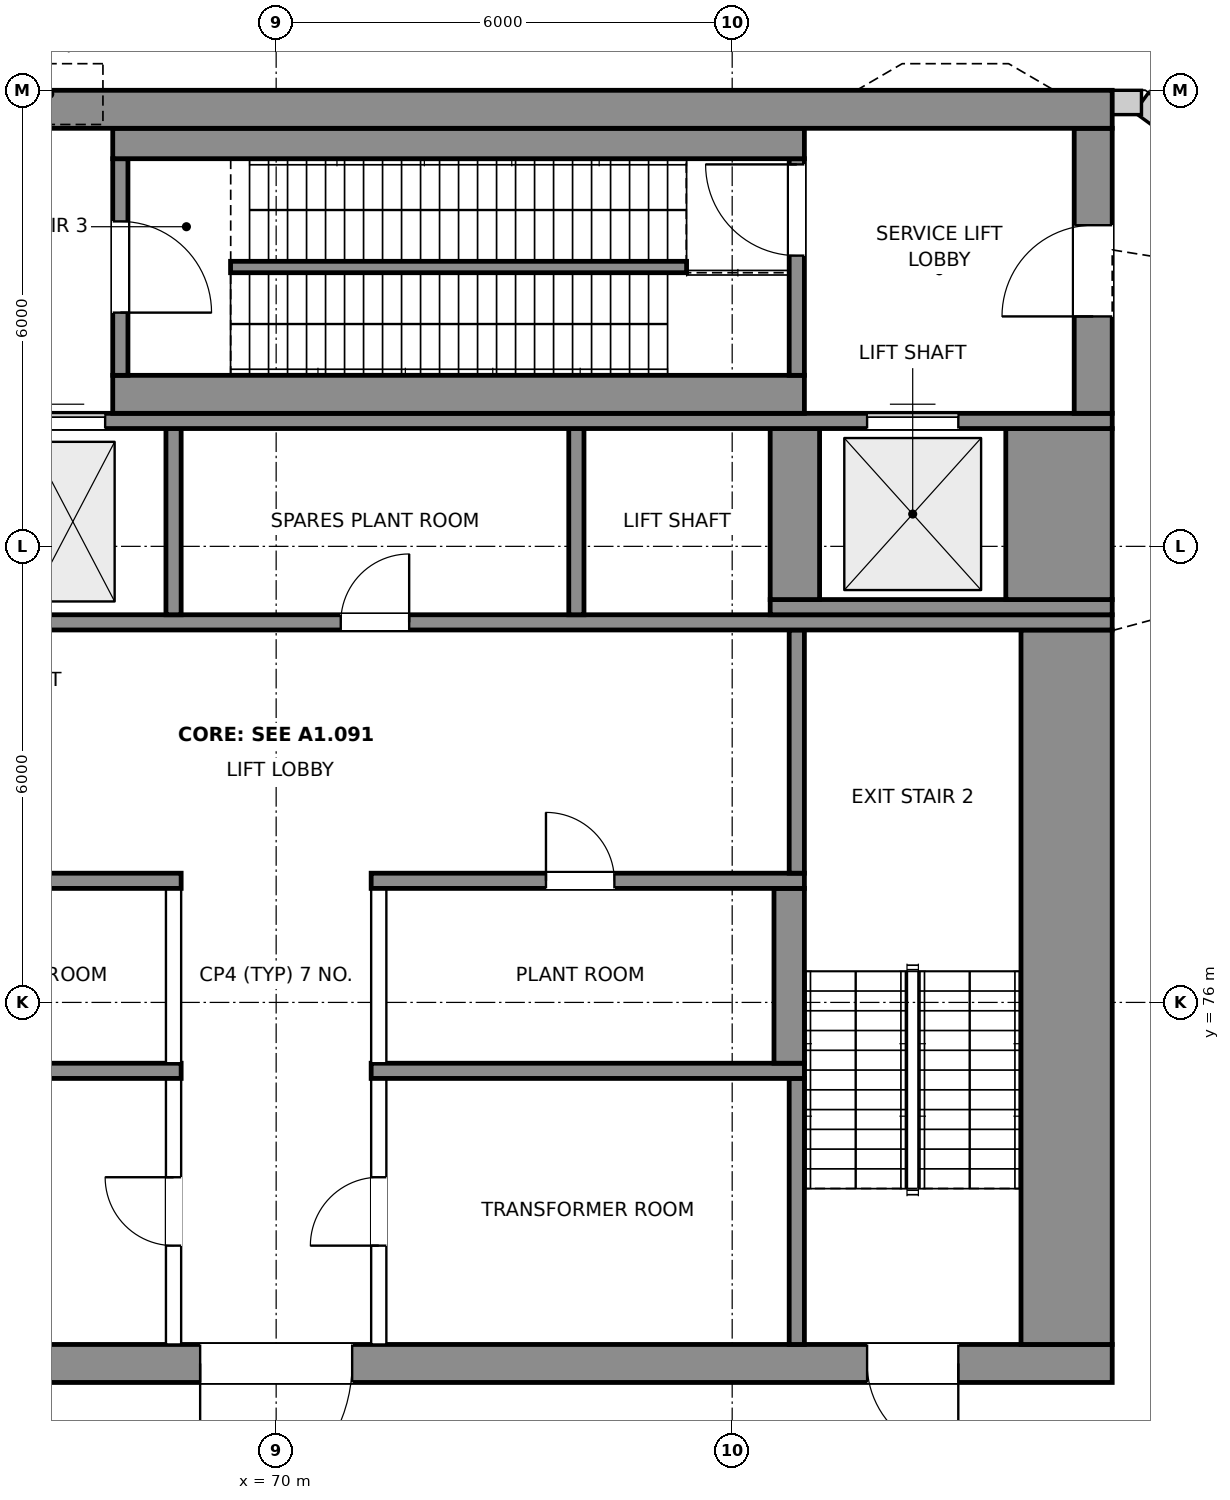
"""IFC4 building model, lengths in metres.
Left out: names, types, materials, properties, quantities, classifications, styles, units other than length and angle.
Written with IfcOpenShell. Run it as: python <this file> out.ifc"""

import sys

from ifc_helpers import new_model, si_unit, direction, frame, frame_2d, origin, place, context, subcontext, project, spatial, rectangle, extrude, element, fill, save


model = new_model("IFC4")
c1 = context("Model", 3, precision=1e-05, world=origin(), true_north=direction((0.0, 1.0)))
c2 = subcontext(c1, "Body", "Model", "MODEL_VIEW")
j1 = project(units=[si_unit("LENGTHUNIT", "METRE"), si_unit("PLANEANGLEUNIT", "RADIAN")], contexts=[c1])
p1 = place(None, origin())
s1 = spatial("IfcSite", under=j1, at=p1, CompositionType="ELEMENT")
p2 = place(p1, origin())
s2 = spatial("IfcBuilding", under=s1, at=p2, CompositionType="ELEMENT")
p3 = place(p2, frame((0.0, 0.0, 328.7)))
s3 = spatial("IfcBuildingStorey", under=s2, at=p3, CompositionType="ELEMENT", Elevation=328.7)
p4 = place(p3, frame((85.979, 84.503, 0.0), z_axis=(0.0, 0.0, 1.0), x_axis=(-0.809014901919, 0.5877881323, 0.0)))
e1 = element("IfcWall", 1, at=p4, inside=s3, PredefinedType="SOLIDWALL", context=c2, shape_type="SweptSolid", body=[
    extrude(rectangle(XDim=5.678, YDim=0.32, at=frame_2d((2.839, 0.0))), origin(), (0.0, 0.0, 1.0), 4.2),
])
p5 = place(p3, frame((81.385, 87.84, 0.0), z_axis=(0.0, 0.0, 1.0), x_axis=(-1.0, 0.0, 0.0)))
e2 = element("IfcWall", 2, at=p5, inside=s3, PredefinedType="SOLIDWALL", context=c2, shape_type="SweptSolid", body=[
    extrude(rectangle(XDim=0.385, YDim=0.32, at=frame_2d((0.192, 0.0))), origin(), (0.0, 0.0, 1.0), 4.2),
])
p6 = place(p3, frame((59.0, 71.25, 0.0), z_axis=(0.0, 0.0, 1.0), x_axis=(1.0, 0.0, 0.0)))
e3 = element("IfcWall", 3, at=p6, inside=s3, PredefinedType="SHEAR", context=c2, shape_type="SweptSolid", body=[
    extrude(rectangle(XDim=22.0, YDim=0.5, at=frame_2d((11.0, 0.0))), origin(), (0.0, 0.0, 1.0), 4.5),
])
p7 = place(p6, frame((2.025, 0.0, 0.0)))
e4 = element("IfcOpeningElement", 4, at=p7, cuts=e3, PredefinedType="OPENING", context=c2, shape_type="SweptSolid", body=[
    extrude(rectangle(XDim=1.2, YDim=2.1, at=frame_2d((0.6, 1.05))), frame((0.0, 0.26, 0.0), z_axis=(0.0, -1.0, 0.0), x_axis=(1.0, 0.0, 0.0)), (0.0, 0.0, 1.0), 0.52),
])
p8 = place(p6, frame((18.775, 0.0, 0.0)))
e5 = element("IfcOpeningElement", 5, at=p8, cuts=e3, PredefinedType="OPENING", context=c2, shape_type="SweptSolid", body=[
    extrude(rectangle(XDim=1.2, YDim=2.1, at=frame_2d((0.6, 1.05))), frame((0.0, 0.26, 0.0), z_axis=(0.0, -1.0, 0.0), x_axis=(1.0, 0.0, 0.0)), (0.0, 0.0, 1.0), 0.52),
])
p9 = place(p6, frame((10.0, 0.0, 0.0)))
e6 = element("IfcOpeningElement", 6, at=p9, cuts=e3, PredefinedType="OPENING", context=c2, shape_type="SweptSolid", body=[
    extrude(rectangle(XDim=2.0, YDim=2.1, at=frame_2d((1.0, 1.05))), frame((0.0, 0.26, 0.0), z_axis=(0.0, -1.0, 0.0), x_axis=(1.0, 0.0, 0.0)), (0.0, 0.0, 1.0), 0.52),
])
p10 = place(p3, frame((68.65, 71.5, 0.0), z_axis=(0.0, 0.0, 1.0), x_axis=(0.0, 1.0, 0.0)))
e7 = element("IfcWall", 7, at=p10, inside=s3, PredefinedType="PARTITIONING", context=c2, shape_type="SweptSolid", body=[
    extrude(rectangle(XDim=3.5, YDim=0.2, at=frame_2d((1.75, 0.0))), origin(), (0.0, 0.0, 1.0), 4.2),
])
p11 = place(p10, frame((1.3, 0.0, 0.0)))
e8 = element("IfcOpeningElement", 8, at=p11, cuts=e7, PredefinedType="OPENING", context=c2, shape_type="SweptSolid", body=[
    extrude(rectangle(XDim=0.9, YDim=2.1, at=frame_2d((0.45, 1.05))), frame((0.0, 0.11, 0.0), z_axis=(0.0, -1.0, 0.0), x_axis=(1.0, 0.0, 0.0)), (0.0, 0.0, 1.0), 0.22),
])
p12 = place(p3, frame((71.35, 71.5, 0.0), z_axis=(0.0, 0.0, 1.0), x_axis=(0.0, 1.0, 0.0)))
e9 = element("IfcWall", 9, at=p12, inside=s3, PredefinedType="PARTITIONING", context=c2, shape_type="SweptSolid", body=[
    extrude(rectangle(XDim=3.5, YDim=0.2, at=frame_2d((1.75, 0.0))), origin(), (0.0, 0.0, 1.0), 4.2),
])
p13 = place(p12, frame((1.3, 0.0, 0.0)))
e10 = element("IfcOpeningElement", 10, at=p13, cuts=e9, PredefinedType="OPENING", context=c2, shape_type="SweptSolid", body=[
    extrude(rectangle(XDim=0.9, YDim=2.1, at=frame_2d((0.45, 1.05))), frame((0.0, 0.11, 0.0), z_axis=(0.0, -1.0, 0.0), x_axis=(1.0, 0.0, 0.0)), (0.0, 0.0, 1.0), 0.22),
])
p14 = place(p3, frame((76.85, 71.5, 0.0), z_axis=(0.0, 0.0, 1.0), x_axis=(0.0, 1.0, 0.0)))
e11 = element("IfcWall", 11, at=p14, inside=s3, PredefinedType="SHEAR", context=c2, shape_type="SweptSolid", body=[
    extrude(rectangle(XDim=3.5, YDim=0.2, at=frame_2d((1.75, 0.0))), origin(), (0.0, 0.0, 1.0), 4.5),
])
p15 = place(p3, frame((80.4, 71.5, 0.0), z_axis=(0.0, 0.0, 1.0), x_axis=(0.0, 1.0, 0.0)))
e12 = element("IfcWall", 12, at=p15, inside=s3, PredefinedType="SHEAR", context=c2, shape_type="SweptSolid", body=[
    extrude(rectangle(XDim=9.4, YDim=1.2, at=frame_2d((4.7, 0.0))), origin(), (0.0, 0.0, 1.0), 4.5),
])
for number, where, z_axis, x_axis in (
    (13, (63.05, 75.1, 0.0), (0.0, 0.0, 1.0), (1.0, 0.0, 0.0)),
    (14, (71.25, 75.1, 0.0), (0.0, 0.0, 1.0), (1.0, 0.0, 0.0)),
):
    element("IfcWall", number, at=place(p3, frame(where, z_axis=z_axis, x_axis=x_axis)), inside=s3, PredefinedType="SHEAR", context=c2, shape_type="SweptSolid", body=[
        extrude(rectangle(XDim=5.7, YDim=0.2, at=frame_2d((2.85, 0.0))), origin(), (0.0, 0.0, 1.0), 4.5),
    ])
for number, where, z_axis, x_axis in (
    (15, (68.65, 75.2, 0.0), (0.0, 0.0, 1.0), (0.0, 1.0, 0.0)),
    (16, (71.35, 75.2, 0.0), (0.0, 0.0, 1.0), (0.0, 1.0, 0.0)),
):
    element("IfcWall", number, at=place(p3, frame(where, z_axis=z_axis, x_axis=x_axis)), inside=s3, PredefinedType="PARTITIONING", context=c2, shape_type="SweptSolid", body=[
        extrude(rectangle(XDim=2.3, YDim=0.2, at=frame_2d((1.15, 0.0))), origin(), (0.0, 0.0, 1.0), 4.2),
    ])
p16 = place(p3, frame((76.75, 75.2, 0.0), z_axis=(0.0, 0.0, 1.0), x_axis=(0.0, 1.0, 0.0)))
e17 = element("IfcWall", 17, at=p16, inside=s3, PredefinedType="SHEAR", context=c2, shape_type="SweptSolid", body=[
    extrude(rectangle(XDim=2.3, YDim=0.4, at=frame_2d((1.15, 0.0))), origin(), (0.0, 0.0, 1.0), 4.5),
])
p17 = place(p3, frame((63.05, 77.6, 0.0), z_axis=(0.0, 0.0, 1.0), x_axis=(1.0, 0.0, 0.0)))
e18 = element("IfcWall", 18, at=p17, inside=s3, PredefinedType="SHEAR", context=c2, shape_type="SweptSolid", body=[
    extrude(rectangle(XDim=5.7, YDim=0.2, at=frame_2d((2.85, 0.0))), origin(), (0.0, 0.0, 1.0), 4.5),
])
p18 = place(p17, frame((2.5, 0.0, 0.0)))
e19 = element("IfcOpeningElement", 19, at=p18, cuts=e18, PredefinedType="OPENING", context=c2, shape_type="SweptSolid", body=[
    extrude(rectangle(XDim=0.9, YDim=2.1, at=frame_2d((0.45, 1.05))), frame((0.0, 0.11, 0.0), z_axis=(0.0, -1.0, 0.0), x_axis=(1.0, 0.0, 0.0)), (0.0, 0.0, 1.0), 0.22),
])
p19 = place(p3, frame((71.25, 77.6, 0.0), z_axis=(0.0, 0.0, 1.0), x_axis=(1.0, 0.0, 0.0)))
e20 = element("IfcWall", 20, at=p19, inside=s3, PredefinedType="SHEAR", context=c2, shape_type="SweptSolid", body=[
    extrude(rectangle(XDim=5.7, YDim=0.2, at=frame_2d((2.85, 0.0))), origin(), (0.0, 0.0, 1.0), 4.5),
])
p20 = place(p19, frame((2.3, 0.0, 0.0)))
e21 = element("IfcOpeningElement", 21, at=p20, cuts=e20, PredefinedType="OPENING", context=c2, shape_type="SweptSolid", body=[
    extrude(rectangle(XDim=0.9, YDim=2.1, at=frame_2d((0.45, 1.05))), frame((0.0, 0.11, 0.0), z_axis=(0.0, -1.0, 0.0), x_axis=(1.0, 0.0, 0.0)), (0.0, 0.0, 1.0), 0.22),
])
p21 = place(p3, frame((76.85, 77.7, 0.0), z_axis=(0.0, 0.0, 1.0), x_axis=(0.0, 1.0, 0.0)))
e22 = element("IfcWall", 22, at=p21, inside=s3, PredefinedType="SHEAR", context=c2, shape_type="SweptSolid", body=[
    extrude(rectangle(XDim=3.2, YDim=0.2, at=frame_2d((1.6, 0.0))), origin(), (0.0, 0.0, 1.0), 4.5),
])
p22 = place(p3, frame((59.0, 81.0, 0.0), z_axis=(0.0, 0.0, 1.0), x_axis=(1.0, 0.0, 0.0)))
e23 = element("IfcWall", 23, at=p22, inside=s3, PredefinedType="SHEAR", context=c2, shape_type="SweptSolid", body=[
    extrude(rectangle(XDim=22.0, YDim=0.2, at=frame_2d((11.0, 0.0))), origin(), (0.0, 0.0, 1.0), 4.5),
])
p23 = place(p22, frame((11.85, 0.0, 0.0)))
e24 = element("IfcOpeningElement", 24, at=p23, cuts=e23, PredefinedType="OPENING", context=c2, shape_type="SweptSolid", body=[
    extrude(rectangle(XDim=0.9, YDim=2.1, at=frame_2d((0.45, 1.05))), frame((0.0, 0.11, 0.0), z_axis=(0.0, -1.0, 0.0), x_axis=(1.0, 0.0, 0.0)), (0.0, 0.0, 1.0), 0.22),
])
for number, where, z_axis, x_axis in (
    (25, (68.65, 81.1, 0.0), (0.0, 0.0, 1.0), (0.0, 1.0, 0.0)),
    (26, (73.95, 81.1, 0.0), (0.0, 0.0, 1.0), (0.0, 1.0, 0.0)),
):
    element("IfcWall", number, at=place(p3, frame(where, z_axis=z_axis, x_axis=x_axis)), inside=s3, PredefinedType="SHEAR", context=c2, shape_type="SweptSolid", body=[
        extrude(rectangle(XDim=2.45, YDim=0.2, at=frame_2d((1.225, 0.0))), origin(), (0.0, 0.0, 1.0), 4.5),
    ])
p24 = place(p3, frame((76.5, 81.2, 0.0), z_axis=(0.0, 0.0, 1.0), x_axis=(1.0, 0.0, 0.0)))
e27 = element("IfcWall", 27, at=p24, inside=s3, PredefinedType="SHEAR", context=c2, shape_type="SweptSolid", body=[
    extrude(rectangle(XDim=4.5, YDim=0.2, at=frame_2d((2.25, 0.0))), origin(), (0.0, 0.0, 1.0), 4.5),
])
p25 = place(p3, frame((76.825, 81.3, 0.0), z_axis=(0.0, 0.0, 1.0), x_axis=(0.0, 1.0, 0.0)))
e28 = element("IfcWall", 28, at=p25, inside=s3, PredefinedType="SHEAR", context=c2, shape_type="SweptSolid", body=[
    extrude(rectangle(XDim=2.25, YDim=0.65, at=frame_2d((1.125, 0.0))), origin(), (0.0, 0.0, 1.0), 4.5),
])
p26 = place(p3, frame((80.3, 81.3, 0.0), z_axis=(0.0, 0.0, 1.0), x_axis=(0.0, 1.0, 0.0)))
e29 = element("IfcWall", 29, at=p26, inside=s3, PredefinedType="SHEAR", context=c2, shape_type="SweptSolid", body=[
    extrude(rectangle(XDim=2.25, YDim=1.4, at=frame_2d((1.125, 0.0))), origin(), (0.0, 0.0, 1.0), 4.5),
])
p27 = place(p3, frame((59.0, 83.65, 0.0), z_axis=(0.0, 0.0, 1.0), x_axis=(1.0, 0.0, 0.0)))
e30 = element("IfcWall", 30, at=p27, inside=s3, PredefinedType="SHEAR", context=c2, shape_type="SweptSolid", body=[
    extrude(rectangle(XDim=22.0, YDim=0.2, at=frame_2d((11.0, 0.0))), origin(), (0.0, 0.0, 1.0), 4.5),
])
p28 = place(p27, frame((5.125, 0.0, 0.0)))
e31 = element("IfcOpeningElement", 31, at=p28, cuts=e30, PredefinedType="OPENING", context=c2, shape_type="SweptSolid", body=[
    extrude(rectangle(XDim=1.1, YDim=2.1, at=frame_2d((0.55, 1.05))), frame((0.0, 0.11, 0.0), z_axis=(0.0, -1.0, 0.0), x_axis=(1.0, 0.0, 0.0)), (0.0, 0.0, 1.0), 0.22),
])
p29 = place(p27, frame((7.65, 0.0, 0.0)))
e32 = element("IfcOpeningElement", 32, at=p29, cuts=e30, PredefinedType="OPENING", context=c2, shape_type="SweptSolid", body=[
    extrude(rectangle(XDim=1.1, YDim=2.1, at=frame_2d((0.55, 1.05))), frame((0.0, 0.11, 0.0), z_axis=(0.0, -1.0, 0.0), x_axis=(1.0, 0.0, 0.0)), (0.0, 0.0, 1.0), 0.22),
])
p30 = place(p27, frame((18.775, 0.0, 0.0)))
e33 = element("IfcOpeningElement", 33, at=p30, cuts=e30, PredefinedType="OPENING", context=c2, shape_type="SweptSolid", body=[
    extrude(rectangle(XDim=1.2, YDim=2.1, at=frame_2d((0.6, 1.05))), frame((0.0, 0.11, 0.0), z_axis=(0.0, -1.0, 0.0), x_axis=(1.0, 0.0, 0.0)), (0.0, 0.0, 1.0), 0.22),
])
p31 = place(p27, frame((2.075, 0.0, 0.0)))
e34 = element("IfcOpeningElement", 34, at=p31, cuts=e30, PredefinedType="OPENING", context=c2, shape_type="SweptSolid", body=[
    extrude(rectangle(XDim=1.1, YDim=2.1, at=frame_2d((0.55, 1.05))), frame((0.0, 0.11, 0.0), z_axis=(0.0, -1.0, 0.0), x_axis=(1.0, 0.0, 0.0)), (0.0, 0.0, 1.0), 0.22),
])
p32 = place(p3, frame((67.85, 84.0, 0.0), z_axis=(0.0, 0.0, 1.0), x_axis=(1.0, 0.0, 0.0)))
e35 = element("IfcWall", 35, at=p32, inside=s3, PredefinedType="SHEAR", context=c2, shape_type="SweptSolid", body=[
    extrude(rectangle(XDim=9.1, YDim=0.5, at=frame_2d((4.55, 0.0))), origin(), (0.0, 0.0, 1.0), 4.5),
])
p33 = place(p3, frame((80.75, 83.75, 0.0), z_axis=(0.0, 0.0, 1.0), x_axis=(0.0, 1.0, 0.0)))
e36 = element("IfcWall", 36, at=p33, inside=s3, PredefinedType="SHEAR", context=c2, shape_type="SweptSolid", body=[
    extrude(rectangle(XDim=3.75, YDim=0.5, at=frame_2d((1.875, 0.0))), origin(), (0.0, 0.0, 1.0), 4.5),
])
p34 = place(p33, frame((1.275, 0.0, 0.0)))
e37 = element("IfcOpeningElement", 37, at=p34, cuts=e36, PredefinedType="OPENING", context=c2, shape_type="SweptSolid", body=[
    extrude(rectangle(XDim=1.2, YDim=2.1, at=frame_2d((0.6, 1.05))), frame((0.0, 0.26, 0.0), z_axis=(0.0, -1.0, 0.0), x_axis=(1.0, 0.0, 0.0)), (0.0, 0.0, 1.0), 0.52),
])
p35 = place(p3, frame((67.95, 84.25, 0.0), z_axis=(0.0, 0.0, 1.0), x_axis=(0.0, 1.0, 0.0)))
e38 = element("IfcWall", 38, at=p35, inside=s3, PredefinedType="SHEAR", context=c2, shape_type="SweptSolid", body=[
    extrude(rectangle(XDim=2.85, YDim=0.2, at=frame_2d((1.425, 0.0))), origin(), (0.0, 0.0, 1.0), 4.5),
])
p36 = place(p35, frame((0.825, 0.0, 0.0)))
e39 = element("IfcOpeningElement", 39, at=p36, cuts=e38, PredefinedType="OPENING", context=c2, shape_type="SweptSolid", body=[
    extrude(rectangle(XDim=1.2, YDim=2.1, at=frame_2d((0.6, 1.05))), frame((0.0, 0.11, 0.0), z_axis=(0.0, -1.0, 0.0), x_axis=(1.0, 0.0, 0.0)), (0.0, 0.0, 1.0), 0.22),
])
p37 = place(p3, frame((76.85, 84.25, 0.0), z_axis=(0.0, 0.0, 1.0), x_axis=(0.0, 1.0, 0.0)))
e40 = element("IfcWall", 40, at=p37, inside=s3, PredefinedType="SHEAR", context=c2, shape_type="SweptSolid", body=[
    extrude(rectangle(XDim=2.85, YDim=0.2, at=frame_2d((1.425, 0.0))), origin(), (0.0, 0.0, 1.0), 4.5),
])
p38 = place(p37, frame((1.575, 0.0, 0.0)))
e41 = element("IfcOpeningElement", 41, at=p38, cuts=e40, PredefinedType="OPENING", context=c2, shape_type="SweptSolid", body=[
    extrude(rectangle(XDim=1.2, YDim=2.1, at=frame_2d((0.6, 1.05))), frame((0.0, 0.11, 0.0), z_axis=(0.0, -1.0, 0.0), x_axis=(1.0, 0.0, 0.0)), (0.0, 0.0, 1.0), 0.22),
])
p39 = place(p3, frame((67.85, 87.3, 0.0), z_axis=(0.0, 0.0, 1.0), x_axis=(1.0, 0.0, 0.0)))
e42 = element("IfcWall", 42, at=p39, inside=s3, PredefinedType="SHEAR", context=c2, shape_type="SweptSolid", body=[
    extrude(rectangle(XDim=9.1, YDim=0.4, at=frame_2d((4.55, 0.0))), origin(), (0.0, 0.0, 1.0), 4.5),
])
p40 = place(p3, frame((59.0, 87.75, 0.0), z_axis=(0.0, 0.0, 1.0), x_axis=(1.0, 0.0, 0.0)))
e43 = element("IfcWall", 43, at=p40, inside=s3, PredefinedType="SHEAR", context=c2, shape_type="SweptSolid", body=[
    extrude(rectangle(XDim=22.0, YDim=0.5, at=frame_2d((11.0, 0.0))), origin(), (0.0, 0.0, 1.0), 4.5),
])
p41 = place(p3, frame((69.4, 85.675, 0.0), z_axis=(0.0, 0.0, 1.0), x_axis=(1.0, 0.0, 0.0)))
e44 = element("IfcWall", 44, at=p41, inside=s3, PredefinedType="SHEAR", context=c2, shape_type="SweptSolid", body=[
    extrude(rectangle(XDim=6.0, YDim=0.15, at=frame_2d((3.0, 0.0))), origin(), (0.0, 0.0, 1.0), 4.5),
])
p42 = place(p8, frame((1.2, 0.0, 0.0), z_axis=(0.0, 0.0, 1.0), x_axis=(-1.0, 0.0, 0.0)))
e45 = element("IfcDoor", 45, at=p42, inside=s3, OperationType="SINGLE_SWING_LEFT", PredefinedType="DOOR", context=c2, shape_type="SweptSolid", body=[
    extrude(rectangle(XDim=1.2, YDim=2.1, at=frame_2d((0.6, 1.05))), frame((0.0, 0.025, 0.0), z_axis=(0.0, -1.0, 0.0), x_axis=(1.0, 0.0, 0.0)), (0.0, 0.0, 1.0), 0.05),
])
fill(e5, e45)
p43 = place(p36, frame((1.2, 0.0, 0.0), z_axis=(0.0, 0.0, 1.0), x_axis=(-1.0, 0.0, 0.0)))
e46 = element("IfcDoor", 46, at=p43, inside=s3, OperationType="SINGLE_SWING_RIGHT", PredefinedType="DOOR", context=c2, shape_type="SweptSolid", body=[
    extrude(rectangle(XDim=1.2, YDim=2.1, at=frame_2d((0.6, 1.05))), frame((0.0, 0.025, 0.0), z_axis=(0.0, -1.0, 0.0), x_axis=(1.0, 0.0, 0.0)), (0.0, 0.0, 1.0), 0.05),
])
fill(e39, e46)
p44 = place(p38, origin())
e47 = element("IfcDoor", 47, at=p44, inside=s3, OperationType="SINGLE_SWING_RIGHT", PredefinedType="DOOR", context=c2, shape_type="SweptSolid", body=[
    extrude(rectangle(XDim=1.2, YDim=2.1, at=frame_2d((0.6, 1.05))), frame((0.0, 0.025, 0.0), z_axis=(0.0, -1.0, 0.0), x_axis=(1.0, 0.0, 0.0)), (0.0, 0.0, 1.0), 0.05),
])
fill(e41, e47)
p45 = place(p9, frame((2.0, 0.0, 0.0), z_axis=(0.0, 0.0, 1.0), x_axis=(-1.0, 0.0, 0.0)))
e48 = element("IfcDoor", 48, at=p45, inside=s3, OperationType="DOUBLE_DOOR_SINGLE_SWING", PredefinedType="DOOR", context=c2, shape_type="SweptSolid", body=[
    extrude(rectangle(XDim=2.0, YDim=2.1, at=frame_2d((1.0, 1.05))), frame((0.0, 0.025, 0.0), z_axis=(0.0, -1.0, 0.0), x_axis=(1.0, 0.0, 0.0)), (0.0, 0.0, 1.0), 0.05),
])
fill(e6, e48)
p46 = place(p11, origin())
e49 = element("IfcDoor", 49, at=p46, inside=s3, OperationType="SINGLE_SWING_RIGHT", PredefinedType="DOOR", context=c2, shape_type="SweptSolid", body=[
    extrude(rectangle(XDim=0.9, YDim=2.1, at=frame_2d((0.45, 1.05))), frame((0.0, 0.025, 0.0), z_axis=(0.0, -1.0, 0.0), x_axis=(1.0, 0.0, 0.0)), (0.0, 0.0, 1.0), 0.05),
])
fill(e8, e49)
p47 = place(p13, origin())
e50 = element("IfcDoor", 50, at=p47, inside=s3, OperationType="SINGLE_SWING_LEFT", PredefinedType="DOOR", context=c2, shape_type="SweptSolid", body=[
    extrude(rectangle(XDim=0.9, YDim=2.1, at=frame_2d((0.45, 1.05))), frame((0.0, 0.025, 0.0), z_axis=(0.0, -1.0, 0.0), x_axis=(1.0, 0.0, 0.0)), (0.0, 0.0, 1.0), 0.05),
])
fill(e10, e50)
p48 = place(p34, origin())
e51 = element("IfcDoor", 51, at=p48, inside=s3, OperationType="SINGLE_SWING_LEFT", PredefinedType="DOOR", context=c2, shape_type="SweptSolid", body=[
    extrude(rectangle(XDim=1.2, YDim=2.1, at=frame_2d((0.6, 1.05))), frame((0.0, 0.025, 0.0), z_axis=(0.0, -1.0, 0.0), x_axis=(1.0, 0.0, 0.0)), (0.0, 0.0, 1.0), 0.05),
])
fill(e37, e51)
p49 = place(p29, origin())
e52 = element("IfcDoor", 52, at=p49, inside=s3, OperationType="DOUBLE_DOOR_SLIDING", PredefinedType="DOOR", context=c2, shape_type="SweptSolid", body=[
    extrude(rectangle(XDim=1.1, YDim=2.1, at=frame_2d((0.55, 1.05))), frame((0.0, 0.025, 0.0), z_axis=(0.0, -1.0, 0.0), x_axis=(1.0, 0.0, 0.0)), (0.0, 0.0, 1.0), 0.05),
])
fill(e32, e52)
p50 = place(p30, origin())
e53 = element("IfcDoor", 53, at=p50, inside=s3, OperationType="DOUBLE_DOOR_SLIDING", PredefinedType="DOOR", context=c2, shape_type="SweptSolid", body=[
    extrude(rectangle(XDim=1.2, YDim=2.1, at=frame_2d((0.6, 1.05))), frame((0.0, 0.025, 0.0), z_axis=(0.0, -1.0, 0.0), x_axis=(1.0, 0.0, 0.0)), (0.0, 0.0, 1.0), 0.05),
])
fill(e33, e53)
p51 = place(p20, origin())
e54 = element("IfcDoor", 54, at=p51, inside=s3, OperationType="SINGLE_SWING_LEFT", PredefinedType="DOOR", context=c2, shape_type="SweptSolid", body=[
    extrude(rectangle(XDim=0.9, YDim=2.1, at=frame_2d((0.45, 1.05))), frame((0.0, 0.025, 0.0), z_axis=(0.0, -1.0, 0.0), x_axis=(1.0, 0.0, 0.0)), (0.0, 0.0, 1.0), 0.05),
])
fill(e21, e54)
p52 = place(p23, origin())
e55 = element("IfcDoor", 55, at=p52, inside=s3, OperationType="SINGLE_SWING_RIGHT", PredefinedType="DOOR", context=c2, shape_type="SweptSolid", body=[
    extrude(rectangle(XDim=0.9, YDim=2.1, at=frame_2d((0.45, 1.05))), frame((0.0, 0.025, 0.0), z_axis=(0.0, -1.0, 0.0), x_axis=(1.0, 0.0, 0.0)), (0.0, 0.0, 1.0), 0.05),
])
fill(e24, e55)
save(model, sys.argv[1])
